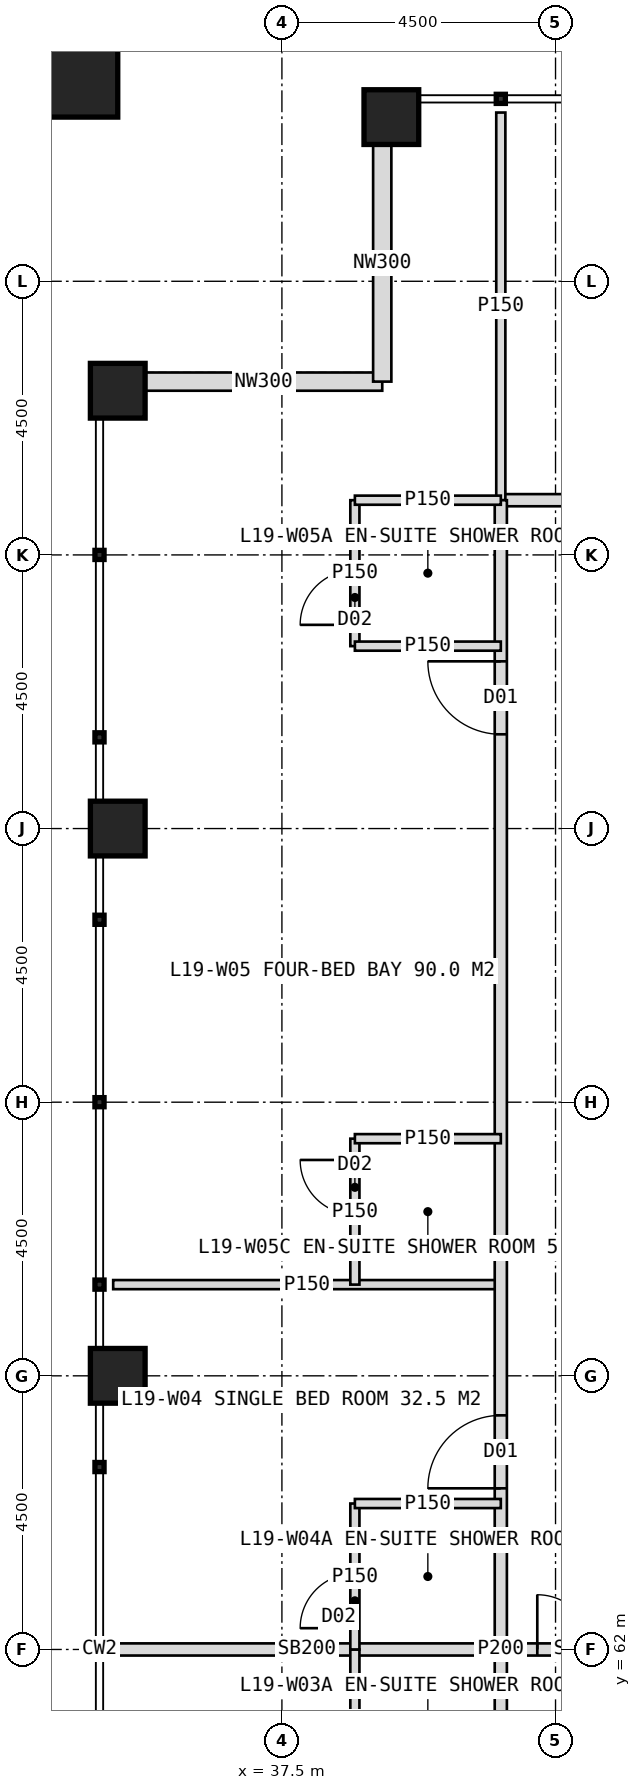
"""IFC4 building model, lengths in metres.
Left out: names, types, materials, properties, quantities, classifications, styles, units other than length and angle.
Written with IfcOpenShell. Run it as: python <this file> out.ifc"""

import sys

from ifc_helpers import new_model, si_unit, direction, frame, frame_2d, origin, origin_2d, place, context, subcontext, project, spatial, rectangle, hollow_rectangle, extrude, element, fill, save


model = new_model("IFC4")
c1 = context("Model", 3, precision=1e-05, world=origin(), true_north=direction((0.0, 1.0)))
c2 = subcontext(c1, "Body", "Model", "MODEL_VIEW")
j1 = project(units=[si_unit("LENGTHUNIT", "METRE"), si_unit("PLANEANGLEUNIT", "RADIAN")], contexts=[c1])
p1 = place(None, origin())
s1 = spatial("IfcSite", under=j1, at=p1, CompositionType="ELEMENT")
p2 = place(p1, origin())
s2 = spatial("IfcBuilding", under=s1, at=p2, CompositionType="ELEMENT")
p3 = place(p2, frame((0.0, 0.0, 83.0)))
s3 = spatial("IfcBuildingStorey", under=s2, at=p3, CompositionType="ELEMENT", Elevation=83.0)
for number, where, z_axis, x_axis in (
    (1, (39.3, 87.2, 0.0), (0.0, 0.0, 1.0), (1.0, 0.0, 0.0)),
    (2, (34.8, 66.5, 0.0), (0.0, 0.0, 1.0), (1.0, 0.0, 0.0)),
    (3, (34.8, 75.5, 0.0), (0.0, 0.0, 1.0), (1.0, 0.0, 0.0)),
    (4, (34.8, 82.7, 0.0), (0.0, 0.0, 1.0), (1.0, 0.0, 0.0)),
):
    element("IfcColumn", number, at=place(p3, frame(where, z_axis=z_axis, x_axis=x_axis)), inside=s3, PredefinedType="COLUMN", context=c2, shape_type="SweptSolid", body=[
        extrude(hollow_rectangle(XDim=0.9, YDim=0.9, WallThickness=0.08, at=origin_2d()), origin(), (0.0, 0.0, 1.0), 4.0),
    ])
p4 = place(p3, frame((33.9, 88.1, 0.0), z_axis=(0.0, 0.0, 1.0), x_axis=(1.0, 0.0, 0.0)))
e5 = element("IfcColumn", 5, at=p4, inside=s3, PredefinedType="COLUMN", context=c2, shape_type="SweptSolid", body=[
    extrude(hollow_rectangle(XDim=1.8, YDim=1.8, WallThickness=0.1, at=origin_2d()), origin(), (0.0, 0.0, 1.0), 4.0),
])
for number, where, z_axis, x_axis in (
    (6, (35.25, 82.85, 0.0), (0.0, 0.0, 1.0), (1.0, 0.0, 0.0)),
    (7, (39.15, 82.85, 0.0), (0.0, 0.0, 1.0), (0.0, 1.0, 0.0)),
):
    element("IfcWall", number, at=place(p3, frame(where, z_axis=z_axis, x_axis=x_axis)), inside=s3, PredefinedType="ELEMENTEDWALL", context=c2, shape_type="SweptSolid", body=[
        extrude(rectangle(XDim=3.9, YDim=0.3, at=frame_2d((1.95, 0.0))), origin(), (0.0, 0.0, 1.0), 2.95),
    ])
p5 = place(p3, frame((41.1, 80.9, 0.0), z_axis=(0.0, 0.0, 1.0), x_axis=(1.0, 0.0, 0.0)))
e8 = element("IfcWall", 8, at=p5, inside=s3, PredefinedType="PARTITIONING", context=c2, shape_type="SweptSolid", body=[
    extrude(rectangle(XDim=37.8, YDim=0.2, at=frame_2d((18.9, 0.0))), origin(), (0.0, 0.0, 1.0), 3.75),
])
p6 = place(p5, frame((5.85, 0.0, 0.0)))
e9 = element("IfcOpeningElement", 9, at=p6, cuts=e8, PredefinedType="OPENING", context=c2, shape_type="SweptSolid", body=[
    extrude(rectangle(XDim=1.2, YDim=2.2, at=frame_2d((0.6, 1.1))), frame((0.0, 0.11, 0.0), z_axis=(0.0, -1.0, 0.0), x_axis=(1.0, 0.0, 0.0)), (0.0, 0.0, 1.0), 0.22),
])
p7 = place(p5, frame((18.3, 0.0, 0.0)))
e10 = element("IfcOpeningElement", 10, at=p7, cuts=e8, PredefinedType="OPENING", context=c2, shape_type="SweptSolid", body=[
    extrude(rectangle(XDim=1.2, YDim=2.2, at=frame_2d((0.6, 1.1))), frame((0.0, 0.11, 0.0), z_axis=(0.0, -1.0, 0.0), x_axis=(1.0, 0.0, 0.0)), (0.0, 0.0, 1.0), 0.22),
])
p8 = place(p5, frame((33.95, 0.0, 0.0)))
e11 = element("IfcOpeningElement", 11, at=p8, cuts=e8, PredefinedType="OPENING", context=c2, shape_type="SweptSolid", body=[
    extrude(rectangle(XDim=1.2, YDim=2.2, at=frame_2d((0.6, 1.1))), frame((0.0, 0.11, 0.0), z_axis=(0.0, -1.0, 0.0), x_axis=(1.0, 0.0, 0.0)), (0.0, 0.0, 1.0), 0.22),
])
p9 = place(p3, frame((41.1, 80.9, 0.0), z_axis=(0.0, 0.0, 1.0), x_axis=(0.0, 1.0, 0.0)))
e12 = element("IfcWall", 12, at=p9, inside=s3, PredefinedType="PARTITIONING", context=c2, shape_type="SweptSolid", body=[
    extrude(rectangle(XDim=6.375, YDim=0.15, at=frame_2d((3.188, 0.0))), origin(), (0.0, 0.0, 1.0), 3.75),
])
p10 = place(p3, frame((41.1, 62.0, 0.0), z_axis=(0.0, 0.0, 1.0), x_axis=(-1.0, 0.0, 0.0)))
e13 = element("IfcWall", 13, at=p10, inside=s3, PredefinedType="SOLIDWALL", context=c2, shape_type="SweptSolid", body=[
    extrude(rectangle(XDim=6.375, YDim=0.2, at=frame_2d((3.188, 0.0))), origin(), (0.0, 0.0, 1.0), 2.75),
])
p11 = place(p3, frame((41.1, 68.0, 0.0), z_axis=(0.0, 0.0, 1.0), x_axis=(-1.0, 0.0, 0.0)))
e14 = element("IfcWall", 14, at=p11, inside=s3, PredefinedType="PARTITIONING", context=c2, shape_type="SweptSolid", body=[
    extrude(rectangle(XDim=6.375, YDim=0.15, at=frame_2d((3.188, 0.0))), origin(), (0.0, 0.0, 1.0), 3.75),
])
p12 = place(p3, frame((41.1, 43.1, 0.0), z_axis=(0.0, 0.0, 1.0), x_axis=(0.0, 1.0, 0.0)))
e15 = element("IfcWall", 15, at=p12, inside=s3, PredefinedType="PARTITIONING", context=c2, shape_type="SweptSolid", body=[
    extrude(rectangle(XDim=37.8, YDim=0.2, at=frame_2d((18.9, 0.0))), origin(), (0.0, 0.0, 1.0), 3.75),
])
p13 = place(p12, frame((2.45, 0.0, 0.0)))
e16 = element("IfcOpeningElement", 16, at=p13, cuts=e15, PredefinedType="OPENING", context=c2, shape_type="SweptSolid", body=[
    extrude(rectangle(XDim=1.2, YDim=2.2, at=frame_2d((0.6, 1.1))), frame((0.0, 0.11, 0.0), z_axis=(0.0, -1.0, 0.0), x_axis=(1.0, 0.0, 0.0)), (0.0, 0.0, 1.0), 0.22),
])
p14 = place(p12, frame((9.55, 0.0, 0.0)))
e17 = element("IfcOpeningElement", 17, at=p14, cuts=e15, PredefinedType="OPENING", context=c2, shape_type="SweptSolid", body=[
    extrude(rectangle(XDim=1.2, YDim=2.2, at=frame_2d((0.6, 1.1))), frame((0.0, 0.11, 0.0), z_axis=(0.0, -1.0, 0.0), x_axis=(1.0, 0.0, 0.0)), (0.0, 0.0, 1.0), 0.22),
])
p15 = place(p12, frame((15.05, 0.0, 0.0)))
e18 = element("IfcOpeningElement", 18, at=p15, cuts=e15, PredefinedType="OPENING", context=c2, shape_type="SweptSolid", body=[
    extrude(rectangle(XDim=1.2, YDim=2.2, at=frame_2d((0.6, 1.1))), frame((0.0, 0.11, 0.0), z_axis=(0.0, -1.0, 0.0), x_axis=(1.0, 0.0, 0.0)), (0.0, 0.0, 1.0), 0.22),
])
p16 = place(p12, frame((21.55, 0.0, 0.0)))
e19 = element("IfcOpeningElement", 19, at=p16, cuts=e15, PredefinedType="OPENING", context=c2, shape_type="SweptSolid", body=[
    extrude(rectangle(XDim=1.2, YDim=2.2, at=frame_2d((0.6, 1.1))), frame((0.0, 0.11, 0.0), z_axis=(0.0, -1.0, 0.0), x_axis=(1.0, 0.0, 0.0)), (0.0, 0.0, 1.0), 0.22),
])
p17 = place(p12, frame((33.95, 0.0, 0.0)))
e20 = element("IfcOpeningElement", 20, at=p17, cuts=e15, PredefinedType="OPENING", context=c2, shape_type="SweptSolid", body=[
    extrude(rectangle(XDim=1.2, YDim=2.2, at=frame_2d((0.6, 1.1))), frame((0.0, 0.11, 0.0), z_axis=(0.0, -1.0, 0.0), x_axis=(1.0, 0.0, 0.0)), (0.0, 0.0, 1.0), 0.22),
])
p18 = place(p3, frame((38.7, 59.6, 0.0), z_axis=(0.0, 0.0, 1.0), x_axis=(0.0, 1.0, 0.0)))
e21 = element("IfcWall", 21, at=p18, inside=s3, PredefinedType="PARTITIONING", context=c2, shape_type="SweptSolid", body=[
    extrude(rectangle(XDim=2.4, YDim=0.15, at=frame_2d((1.2, 0.0))), origin(), (0.0, 0.0, 1.0), 3.75),
])
p19 = place(p18, frame((0.35, 0.0, 0.0)))
e22 = element("IfcOpeningElement", 22, at=p19, cuts=e21, PredefinedType="OPENING", context=c2, shape_type="SweptSolid", body=[
    extrude(rectangle(XDim=0.9, YDim=2.1, at=frame_2d((0.45, 1.05))), frame((0.0, 0.085, 0.0), z_axis=(0.0, -1.0, 0.0), x_axis=(1.0, 0.0, 0.0)), (0.0, 0.0, 1.0), 0.17),
])
p20 = place(p3, frame((38.7, 62.0, 0.0), z_axis=(0.0, 0.0, 1.0), x_axis=(0.0, 1.0, 0.0)))
e23 = element("IfcWall", 23, at=p20, inside=s3, PredefinedType="PARTITIONING", context=c2, shape_type="SweptSolid", body=[
    extrude(rectangle(XDim=2.4, YDim=0.15, at=frame_2d((1.2, 0.0))), origin(), (0.0, 0.0, 1.0), 3.75),
])
p21 = place(p20, frame((0.35, 0.0, 0.0)))
e24 = element("IfcOpeningElement", 24, at=p21, cuts=e23, PredefinedType="OPENING", context=c2, shape_type="SweptSolid", body=[
    extrude(rectangle(XDim=0.9, YDim=2.1, at=frame_2d((0.45, 1.05))), frame((0.0, 0.085, 0.0), z_axis=(0.0, -1.0, 0.0), x_axis=(1.0, 0.0, 0.0)), (0.0, 0.0, 1.0), 0.17),
])
p22 = place(p3, frame((41.1, 64.4, 0.0), z_axis=(0.0, 0.0, 1.0), x_axis=(-1.0, 0.0, 0.0)))
e25 = element("IfcWall", 25, at=p22, inside=s3, PredefinedType="PARTITIONING", context=c2, shape_type="SweptSolid", body=[
    extrude(rectangle(XDim=2.4, YDim=0.15, at=frame_2d((1.2, 0.0))), origin(), (0.0, 0.0, 1.0), 3.75),
])
p23 = place(p3, frame((38.7, 78.5, 0.0), z_axis=(0.0, 0.0, 1.0), x_axis=(0.0, 1.0, 0.0)))
e26 = element("IfcWall", 26, at=p23, inside=s3, PredefinedType="PARTITIONING", context=c2, shape_type="SweptSolid", body=[
    extrude(rectangle(XDim=2.4, YDim=0.15, at=frame_2d((1.2, 0.0))), origin(), (0.0, 0.0, 1.0), 3.75),
])
p24 = place(p23, frame((0.35, 0.0, 0.0)))
e27 = element("IfcOpeningElement", 27, at=p24, cuts=e26, PredefinedType="OPENING", context=c2, shape_type="SweptSolid", body=[
    extrude(rectangle(XDim=0.9, YDim=2.1, at=frame_2d((0.45, 1.05))), frame((0.0, 0.085, 0.0), z_axis=(0.0, -1.0, 0.0), x_axis=(1.0, 0.0, 0.0)), (0.0, 0.0, 1.0), 0.17),
])
p25 = place(p3, frame((41.1, 78.5, 0.0), z_axis=(0.0, 0.0, 1.0), x_axis=(-1.0, 0.0, 0.0)))
e28 = element("IfcWall", 28, at=p25, inside=s3, PredefinedType="PARTITIONING", context=c2, shape_type="SweptSolid", body=[
    extrude(rectangle(XDim=2.4, YDim=0.15, at=frame_2d((1.2, 0.0))), origin(), (0.0, 0.0, 1.0), 3.75),
])
p26 = place(p3, frame((38.7, 68.0, 0.0), z_axis=(0.0, 0.0, 1.0), x_axis=(0.0, 1.0, 0.0)))
e29 = element("IfcWall", 29, at=p26, inside=s3, PredefinedType="PARTITIONING", context=c2, shape_type="SweptSolid", body=[
    extrude(rectangle(XDim=2.4, YDim=0.15, at=frame_2d((1.2, 0.0))), origin(), (0.0, 0.0, 1.0), 3.75),
])
p27 = place(p26, frame((1.15, 0.0, 0.0)))
e30 = element("IfcOpeningElement", 30, at=p27, cuts=e29, PredefinedType="OPENING", context=c2, shape_type="SweptSolid", body=[
    extrude(rectangle(XDim=0.9, YDim=2.1, at=frame_2d((0.45, 1.05))), frame((0.0, 0.085, 0.0), z_axis=(0.0, -1.0, 0.0), x_axis=(1.0, 0.0, 0.0)), (0.0, 0.0, 1.0), 0.17),
])
for number, where, z_axis, x_axis in (
    (31, (41.1, 70.4, 0.0), (0.0, 0.0, 1.0), (-1.0, 0.0, 0.0)),
    (32, (41.1, 80.9, 0.0), (0.0, 0.0, 1.0), (-1.0, 0.0, 0.0)),
):
    element("IfcWall", number, at=place(p3, frame(where, z_axis=z_axis, x_axis=x_axis)), inside=s3, PredefinedType="PARTITIONING", context=c2, shape_type="SweptSolid", body=[
        extrude(rectangle(XDim=2.4, YDim=0.15, at=frame_2d((1.2, 0.0))), origin(), (0.0, 0.0, 1.0), 3.75),
    ])
p28 = place(p3, frame((43.8, 62.0, 0.0), z_axis=(0.0, 0.0, 1.0), x_axis=(-1.0, 0.0, 0.0)))
e33 = element("IfcWall", 33, at=p28, inside=s3, PredefinedType="SOLIDWALL", context=c2, shape_type="SweptSolid", body=[
    extrude(rectangle(XDim=2.7, YDim=0.2, at=frame_2d((1.35, 0.0))), origin(), (0.0, 0.0, 1.0), 2.75),
])
p29 = place(p28, frame((0.3, 0.0, 0.0)))
e34 = element("IfcOpeningElement", 34, at=p29, cuts=e33, PredefinedType="OPENING", context=c2, shape_type="SweptSolid", body=[
    extrude(rectangle(XDim=1.8, YDim=2.2, at=frame_2d((0.9, 1.1))), frame((0.0, 0.11, 0.0), z_axis=(0.0, -1.0, 0.0), x_axis=(1.0, 0.0, 0.0)), (0.0, 0.0, 1.0), 0.22),
])
p30 = place(p16, origin())
e35 = element("IfcDoor", 35, at=p30, inside=s3, OperationType="SINGLE_SWING_LEFT", PredefinedType="DOOR", context=c2, shape_type="SweptSolid", body=[
    extrude(rectangle(XDim=1.2, YDim=2.2, at=frame_2d((0.6, 1.1))), frame((0.0, 0.025, 0.0), z_axis=(0.0, -1.0, 0.0), x_axis=(1.0, 0.0, 0.0)), (0.0, 0.0, 1.0), 0.05),
])
fill(e19, e35)
p31 = place(p21, origin())
e36 = element("IfcDoor", 36, at=p31, inside=s3, OperationType="SINGLE_SWING_LEFT", PredefinedType="DOOR", context=c2, shape_type="SweptSolid", body=[
    extrude(rectangle(XDim=0.9, YDim=2.1, at=frame_2d((0.45, 1.05))), frame((0.0, 0.025, 0.0), z_axis=(0.0, -1.0, 0.0), x_axis=(1.0, 0.0, 0.0)), (0.0, 0.0, 1.0), 0.05),
])
fill(e24, e36)
p32 = place(p17, origin())
e37 = element("IfcDoor", 37, at=p32, inside=s3, OperationType="SINGLE_SWING_RIGHT", PredefinedType="DOOR", context=c2, shape_type="SweptSolid", body=[
    extrude(rectangle(XDim=1.2, YDim=2.2, at=frame_2d((0.6, 1.1))), frame((0.0, 0.025, 0.0), z_axis=(0.0, -1.0, 0.0), x_axis=(1.0, 0.0, 0.0)), (0.0, 0.0, 1.0), 0.05),
])
fill(e20, e37)
p33 = place(p24, origin())
e38 = element("IfcDoor", 38, at=p33, inside=s3, OperationType="SINGLE_SWING_LEFT", PredefinedType="DOOR", context=c2, shape_type="SweptSolid", body=[
    extrude(rectangle(XDim=0.9, YDim=2.1, at=frame_2d((0.45, 1.05))), frame((0.0, 0.025, 0.0), z_axis=(0.0, -1.0, 0.0), x_axis=(1.0, 0.0, 0.0)), (0.0, 0.0, 1.0), 0.05),
])
fill(e27, e38)
p34 = place(p27, origin())
e39 = element("IfcDoor", 39, at=p34, inside=s3, OperationType="SINGLE_SWING_RIGHT", PredefinedType="DOOR", context=c2, shape_type="SweptSolid", body=[
    extrude(rectangle(XDim=0.9, YDim=2.1, at=frame_2d((0.45, 1.05))), frame((0.0, 0.025, 0.0), z_axis=(0.0, -1.0, 0.0), x_axis=(1.0, 0.0, 0.0)), (0.0, 0.0, 1.0), 0.05),
])
fill(e30, e39)
p35 = place(p29, origin())
e40 = element("IfcDoor", 40, at=p35, inside=s3, OperationType="DOUBLE_DOOR_DOUBLE_SWING", PredefinedType="DOOR", context=c2, shape_type="SweptSolid", body=[
    extrude(rectangle(XDim=1.8, YDim=2.2, at=frame_2d((0.9, 1.1))), frame((0.0, 0.025, 0.0), z_axis=(0.0, -1.0, 0.0), x_axis=(1.0, 0.0, 0.0)), (0.0, 0.0, 1.0), 0.05),
])
fill(e34, e40)
save(model, sys.argv[1])
